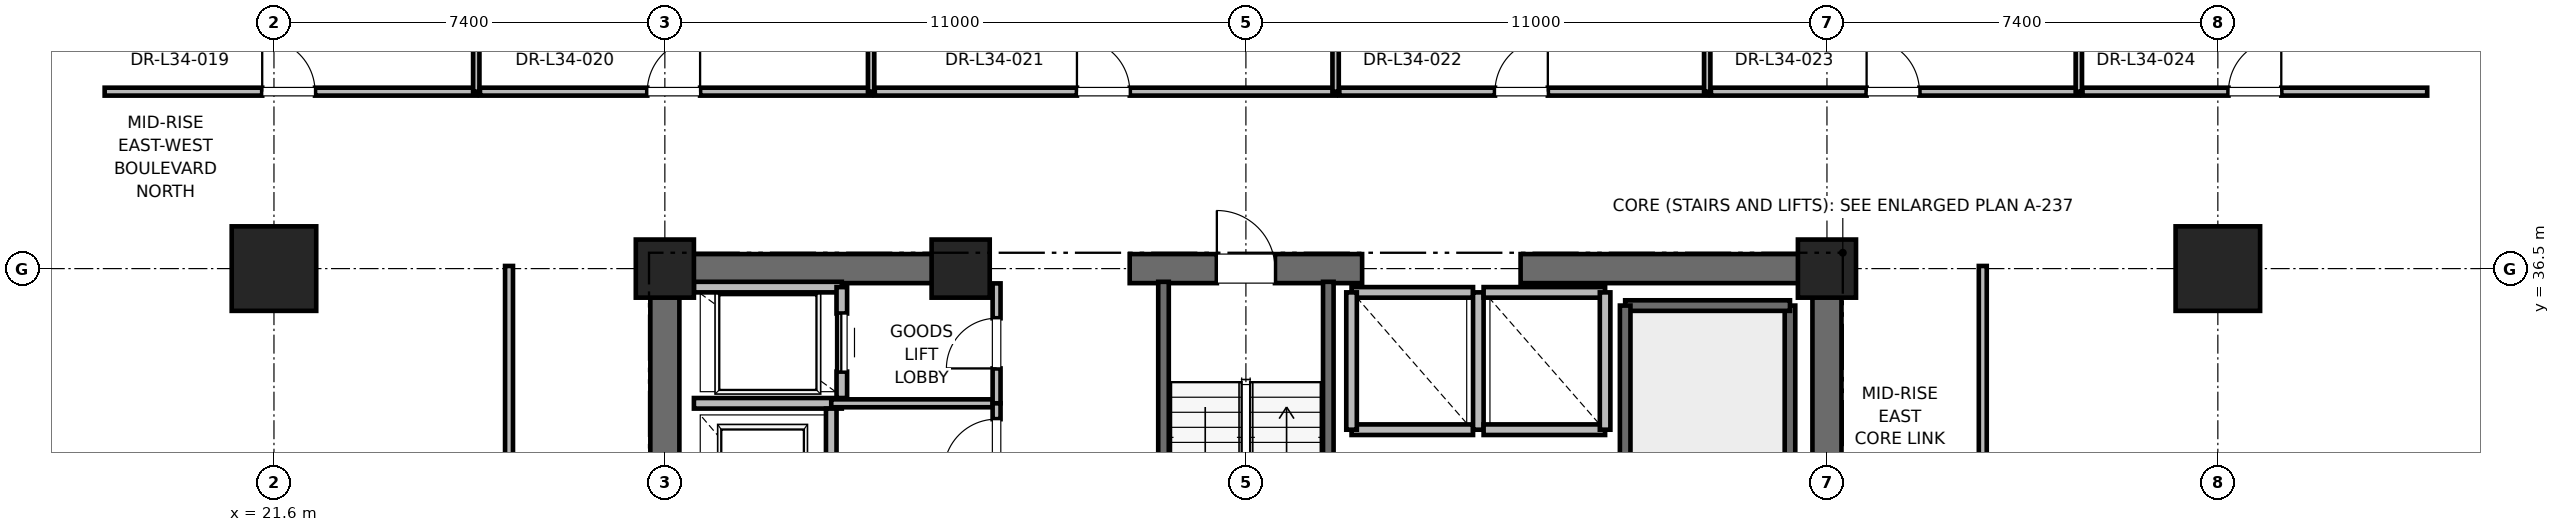
"""IFC4 building model, lengths in metres.
Left out: names, types, materials, properties, quantities, classifications, styles, units other than length and angle.
Written with IfcOpenShell. Run it as: python <this file> out.ifc"""

import sys

from ifc_helpers import new_model, si_unit, direction, frame, frame_2d, origin, origin_2d, place, context, subcontext, project, spatial, rectangle, extrude, element, fill, save


model = new_model("IFC4")
c1 = context("Model", 3, precision=1e-05, world=origin(), true_north=direction((0.0, 1.0)))
c2 = subcontext(c1, "Body", "Model", "MODEL_VIEW")
j1 = project(units=[si_unit("LENGTHUNIT", "METRE"), si_unit("PLANEANGLEUNIT", "RADIAN")], contexts=[c1])
p1 = place(None, origin())
s1 = spatial("IfcSite", under=j1, at=p1, CompositionType="ELEMENT")
p2 = place(p1, origin())
s2 = spatial("IfcBuilding", under=s1, at=p2, CompositionType="ELEMENT")
p3 = place(p2, frame((0.0, 0.0, 148.4)))
s3 = spatial("IfcBuildingStorey", under=s2, at=p3, CompositionType="ELEMENT", Elevation=148.4)
for number, where, z_axis, x_axis in (
    (1, (21.6, 36.5, 0.0), (0.0, 0.0, 1.0), (1.0, 0.0, 0.0)),
    (2, (58.4, 36.5, 0.0), (0.0, 0.0, 1.0), (1.0, 0.0, 0.0)),
):
    element("IfcColumn", number, at=place(p3, frame(where, z_axis=z_axis, x_axis=x_axis)), inside=s3, PredefinedType="COLUMN", context=c2, shape_type="SweptSolid", body=[
        extrude(rectangle(XDim=1.6, YDim=1.6, at=origin_2d()), origin(), (0.0, 0.0, 1.0), 4.0),
    ])
for number, where, z_axis, x_axis in (
    (3, (29.0, 36.5, 0.0), (0.0, 0.0, 1.0), (1.0, 0.0, 0.0)),
    (4, (51.0, 36.5, 0.0), (0.0, 0.0, 1.0), (1.0, 0.0, 0.0)),
    (5, (34.6, 36.5, 0.0), (0.0, 0.0, 1.0), (1.0, 0.0, 0.0)),
):
    element("IfcColumn", number, at=place(p3, frame(where, z_axis=z_axis, x_axis=x_axis)), inside=s3, PredefinedType="PILASTER", context=c2, shape_type="SweptSolid", body=[
        extrude(rectangle(XDim=1.1, YDim=1.1, at=origin_2d()), origin(), (0.0, 0.0, 1.0), 4.0),
    ])
p4 = place(p3, frame((29.0, 36.5, 0.0), z_axis=(0.0, 0.0, 1.0), x_axis=(1.0, 0.0, 0.0)))
e6 = element("IfcWall", 6, at=p4, inside=s3, PredefinedType="SHEAR", context=c2, shape_type="SweptSolid", body=[
    extrude(rectangle(XDim=5.8, YDim=0.55, at=frame_2d((2.9, 0.0))), origin(), (0.0, 0.0, 1.0), 3.775),
])
p5 = place(p3, frame((37.8, 36.5, 0.0), z_axis=(0.0, 0.0, 1.0), x_axis=(1.0, 0.0, 0.0)))
e7 = element("IfcWall", 7, at=p5, inside=s3, PredefinedType="SHEAR", context=c2, shape_type="SweptSolid", body=[
    extrude(rectangle(XDim=4.4, YDim=0.55, at=frame_2d((2.2, 0.0))), origin(), (0.0, 0.0, 1.0), 3.775),
])
p6 = place(p5, frame((1.65, 0.0, 0.0)))
e8 = element("IfcOpeningElement", 8, at=p6, cuts=e7, PredefinedType="OPENING", context=c2, shape_type="SweptSolid", body=[
    extrude(rectangle(XDim=1.1, YDim=2.15, at=frame_2d((0.55, 1.075))), frame((0.0, 0.275, 0.0), z_axis=(0.0, -1.0, 0.0), x_axis=(1.0, 0.0, 0.0)), (0.0, 0.0, 1.0), 0.55),
])
for number, where, z_axis, x_axis in (
    (9, (45.2, 36.5, 0.0), (0.0, 0.0, 1.0), (1.0, 0.0, 0.0)),
    (10, (29.0, 30.7, 0.0), (0.0, 0.0, 1.0), (0.0, 1.0, 0.0)),
):
    element("IfcWall", number, at=place(p3, frame(where, z_axis=z_axis, x_axis=x_axis)), inside=s3, PredefinedType="SHEAR", context=c2, shape_type="SweptSolid", body=[
        extrude(rectangle(XDim=5.8, YDim=0.55, at=frame_2d((2.9, 0.0))), origin(), (0.0, 0.0, 1.0), 3.775),
    ])
p7 = place(p3, frame((51.0, 27.7, 0.0), z_axis=(0.0, 0.0, 1.0), x_axis=(0.0, 1.0, 0.0)))
e11 = element("IfcWall", 11, at=p7, inside=s3, PredefinedType="SHEAR", context=c2, shape_type="SweptSolid", body=[
    extrude(rectangle(XDim=8.8, YDim=0.55, at=frame_2d((4.4, 0.0))), origin(), (0.0, 0.0, 1.0), 3.775),
])
p8 = place(p3, frame((50.3, 27.65, 0.0), z_axis=(0.0, 0.0, 1.0), x_axis=(0.0, 1.0, 0.0)))
e12 = element("IfcWall", 12, at=p8, inside=s3, PredefinedType="SOLIDWALL", context=c2, shape_type="SweptSolid", body=[
    extrude(rectangle(XDim=8.15, YDim=0.2, at=frame_2d((4.075, 0.0))), origin(), (0.0, 0.0, 1.0), 3.775),
])
p9 = place(p3, frame((47.18, 35.8, 0.0), z_axis=(0.0, 0.0, 1.0), x_axis=(1.0, 0.0, 0.0)))
e13 = element("IfcWall", 13, at=p9, inside=s3, PredefinedType="SOLIDWALL", context=c2, shape_type="SweptSolid", body=[
    extrude(rectangle(XDim=3.12, YDim=0.2, at=frame_2d((1.56, 0.0))), origin(), (0.0, 0.0, 1.0), 3.775),
])
p10 = place(p3, frame((47.18, 27.62, 0.0), z_axis=(0.0, 0.0, 1.0), x_axis=(0.0, 1.0, 0.0)))
e14 = element("IfcWall", 14, at=p10, inside=s3, PredefinedType="SOLIDWALL", context=c2, shape_type="SweptSolid", body=[
    extrude(rectangle(XDim=8.18, YDim=0.2, at=frame_2d((4.09, 0.0))), origin(), (0.0, 0.0, 1.0), 3.775),
])
p11 = place(p3, frame((38.44, 27.38, 0.0), z_axis=(0.0, 0.0, 1.0), x_axis=(0.0, 1.0, 0.0)))
e15 = element("IfcWall", 15, at=p11, inside=s3, PredefinedType="SOLIDWALL", context=c2, shape_type="SweptSolid", body=[
    extrude(rectangle(XDim=8.87, YDim=0.2, at=frame_2d((4.435, 0.0))), origin(), (0.0, 0.0, 1.0), 3.775),
])
p12 = place(p3, frame((41.56, 27.68, 0.0), z_axis=(0.0, 0.0, 1.0), x_axis=(0.0, 1.0, 0.0)))
e16 = element("IfcWall", 16, at=p12, inside=s3, PredefinedType="SOLIDWALL", context=c2, shape_type="SweptSolid", body=[
    extrude(rectangle(XDim=8.57, YDim=0.2, at=frame_2d((4.285, 0.0))), origin(), (0.0, 0.0, 1.0), 3.775),
])
p13 = place(p3, frame((29.55, 33.95, 0.0), z_axis=(0.0, 0.0, 1.0), x_axis=(1.0, 0.0, 0.0)))
e17 = element("IfcWall", 17, at=p13, inside=s3, PredefinedType="SOLIDWALL", context=c2, shape_type="SweptSolid", body=[
    extrude(rectangle(XDim=2.8, YDim=0.2, at=frame_2d((1.4, 0.0))), origin(), (0.0, 0.0, 1.0), 3.775),
])
p14 = place(p3, frame((32.15, 30.85, 0.0), z_axis=(0.0, 0.0, 1.0), x_axis=(0.0, 1.0, 0.0)))
e18 = element("IfcWall", 18, at=p14, inside=s3, PredefinedType="SOLIDWALL", context=c2, shape_type="SweptSolid", body=[
    extrude(rectangle(XDim=3.0, YDim=0.2, at=frame_2d((1.5, 0.0))), origin(), (0.0, 0.0, 1.0), 3.775),
])
p15 = place(p3, frame((32.35, 36.15, 0.0), z_axis=(0.0, 0.0, 1.0), x_axis=(-1.0, 0.0, 0.0)))
e19 = element("IfcWall", 19, at=p15, inside=s3, PredefinedType="SOLIDWALL", context=c2, shape_type="SweptSolid", body=[
    extrude(rectangle(XDim=2.8, YDim=0.2, at=frame_2d((1.4, 0.0))), origin(), (0.0, 0.0, 1.0), 2.985),
])
p16 = place(p3, frame((32.35, 34.05, 0.0), z_axis=(0.0, 0.0, 1.0), x_axis=(0.0, 1.0, 0.0)))
e20 = element("IfcWall", 20, at=p16, inside=s3, PredefinedType="SOLIDWALL", context=c2, shape_type="SweptSolid", body=[
    extrude(rectangle(XDim=2.1, YDim=0.2, at=frame_2d((1.05, 0.0))), origin(), (0.0, 0.0, 1.0), 3.775),
])
p17 = place(p16, frame((0.5, 0.0, 0.0)))
e21 = element("IfcOpeningElement", 21, at=p17, cuts=e20, PredefinedType="OPENING", context=c2, shape_type="SweptSolid", body=[
    extrude(rectangle(XDim=1.1, YDim=2.2, at=frame_2d((0.55, 1.1))), frame((0.0, 0.1, 0.0), z_axis=(0.0, -1.0, 0.0), x_axis=(1.0, 0.0, 0.0)), (0.0, 0.0, 1.0), 0.2),
])
p18 = place(p3, frame((42.0, 33.45, 0.0), z_axis=(0.0, 0.0, 1.0), x_axis=(1.0, 0.0, 0.0)))
e22 = element("IfcWall", 22, at=p18, inside=s3, PredefinedType="SOLIDWALL", context=c2, shape_type="SweptSolid", body=[
    extrude(rectangle(XDim=2.3, YDim=0.2, at=frame_2d((1.15, 0.0))), origin(), (0.0, 0.0, 1.0), 3.775),
])
p19 = place(p3, frame((44.3, 36.05, 0.0), z_axis=(0.0, 0.0, 1.0), x_axis=(-1.0, 0.0, 0.0)))
e23 = element("IfcWall", 23, at=p19, inside=s3, PredefinedType="SOLIDWALL", context=c2, shape_type="SweptSolid", body=[
    extrude(rectangle(XDim=2.3, YDim=0.2, at=frame_2d((1.15, 0.0))), origin(), (0.0, 0.0, 1.0), 2.755),
])
for number, where, z_axis, x_axis in (
    (24, (42.0, 36.05, 0.0), (0.0, 0.0, 1.0), (0.0, -1.0, 0.0)),
    (25, (44.4, 33.45, 0.0), (0.0, 0.0, 1.0), (0.0, 1.0, 0.0)),
):
    element("IfcWall", number, at=place(p3, frame(where, z_axis=z_axis, x_axis=x_axis)), inside=s3, PredefinedType="SOLIDWALL", context=c2, shape_type="SweptSolid", body=[
        extrude(rectangle(XDim=2.6, YDim=0.2, at=frame_2d((1.3, 0.0))), origin(), (0.0, 0.0, 1.0), 2.755),
    ])
p20 = place(p3, frame((44.5, 33.45, 0.0), z_axis=(0.0, 0.0, 1.0), x_axis=(1.0, 0.0, 0.0)))
e26 = element("IfcWall", 26, at=p20, inside=s3, PredefinedType="SOLIDWALL", context=c2, shape_type="SweptSolid", body=[
    extrude(rectangle(XDim=2.3, YDim=0.2, at=frame_2d((1.15, 0.0))), origin(), (0.0, 0.0, 1.0), 3.775),
])
p21 = place(p3, frame((46.8, 36.05, 0.0), z_axis=(0.0, 0.0, 1.0), x_axis=(-1.0, 0.0, 0.0)))
e27 = element("IfcWall", 27, at=p21, inside=s3, PredefinedType="SOLIDWALL", context=c2, shape_type="SweptSolid", body=[
    extrude(rectangle(XDim=2.3, YDim=0.2, at=frame_2d((1.15, 0.0))), origin(), (0.0, 0.0, 1.0), 2.755),
])
p22 = place(p3, frame((46.8, 33.45, 0.0), z_axis=(0.0, 0.0, 1.0), x_axis=(0.0, 1.0, 0.0)))
e28 = element("IfcWall", 28, at=p22, inside=s3, PredefinedType="SOLIDWALL", context=c2, shape_type="SweptSolid", body=[
    extrude(rectangle(XDim=2.6, YDim=0.2, at=frame_2d((1.3, 0.0))), origin(), (0.0, 0.0, 1.0), 3.775),
])
p23 = place(p3, frame((32.15, 33.95, 0.0), z_axis=(0.0, 0.0, 1.0), x_axis=(1.0, 0.0, 0.0)))
e29 = element("IfcWall", 29, at=p23, inside=s3, PredefinedType="PARTITIONING", context=c2, shape_type="SweptSolid", body=[
    extrude(rectangle(XDim=3.13, YDim=0.15, at=frame_2d((1.565, 0.0))), origin(), (0.0, 0.0, 1.0), 2.85),
])
p24 = place(p3, frame((35.28, 33.95, 0.0), z_axis=(0.0, 0.0, 1.0), x_axis=(0.0, 1.0, 0.0)))
e30 = element("IfcWall", 30, at=p24, inside=s3, PredefinedType="PARTITIONING", context=c2, shape_type="SweptSolid", body=[
    extrude(rectangle(XDim=2.27, YDim=0.15, at=frame_2d((1.135, 0.0))), origin(), (0.0, 0.0, 1.0), 2.755),
])
p25 = place(p24, frame((0.66, 0.0, 0.0)))
e31 = element("IfcOpeningElement", 31, at=p25, cuts=e30, PredefinedType="OPENING", context=c2, shape_type="SweptSolid", body=[
    extrude(rectangle(XDim=0.95, YDim=2.15, at=frame_2d((0.475, 1.075))), frame((0.0, 0.075, 0.0), z_axis=(0.0, -1.0, 0.0), x_axis=(1.0, 0.0, 0.0)), (0.0, 0.0, 1.0), 0.15),
])
p26 = place(p3, frame((35.28, 32.35, 0.0), z_axis=(0.0, 0.0, 1.0), x_axis=(0.0, 1.0, 0.0)))
e32 = element("IfcWall", 32, at=p26, inside=s3, PredefinedType="PARTITIONING", context=c2, shape_type="SweptSolid", body=[
    extrude(rectangle(XDim=1.6, YDim=0.15, at=frame_2d((0.8, 0.0))), origin(), (0.0, 0.0, 1.0), 2.85),
])
p27 = place(p26, frame((0.3, 0.0, 0.0)))
e33 = element("IfcOpeningElement", 33, at=p27, cuts=e32, PredefinedType="OPENING", context=c2, shape_type="SweptSolid", body=[
    extrude(rectangle(XDim=1.0, YDim=2.15, at=frame_2d((0.5, 1.075))), frame((0.0, 0.075, 0.0), z_axis=(0.0, -1.0, 0.0), x_axis=(1.0, 0.0, 0.0)), (0.0, 0.0, 1.0), 0.15),
])
p28 = place(p3, frame((18.395, 39.85, 0.0), z_axis=(0.0, 0.0, 1.0), x_axis=(1.0, 0.0, 0.0)))
e34 = element("IfcWall", 34, at=p28, inside=s3, PredefinedType="PARTITIONING", context=c2, shape_type="SweptSolid", body=[
    extrude(rectangle(XDim=7.035, YDim=0.15, at=frame_2d((3.518, 0.0))), origin(), (0.0, 0.0, 1.0), 2.85),
])
p29 = place(p28, frame((2.982, 0.0, 0.0)))
e35 = element("IfcOpeningElement", 35, at=p29, cuts=e34, PredefinedType="OPENING", context=c2, shape_type="SweptSolid", body=[
    extrude(rectangle(XDim=1.0, YDim=2.15, at=frame_2d((0.5, 1.075))), frame((0.0, 0.075, 0.0), z_axis=(0.0, -1.0, 0.0), x_axis=(1.0, 0.0, 0.0)), (0.0, 0.0, 1.0), 0.15),
])
p30 = place(p3, frame((25.43, 39.85, 0.0), z_axis=(0.0, 0.0, 1.0), x_axis=(0.0, 1.0, 0.0)))
e36 = element("IfcWall", 36, at=p30, inside=s3, PredefinedType="PARTITIONING", context=c2, shape_type="SweptSolid", body=[
    extrude(rectangle(XDim=9.854, YDim=0.12, at=frame_2d((4.927, 0.0))), origin(), (0.0, 0.0, 1.0), 2.85),
])
p31 = place(p3, frame((25.5, 39.85, 0.0), z_axis=(0.0, 0.0, 1.0), x_axis=(1.0, 0.0, 0.0)))
e37 = element("IfcWall", 37, at=p31, inside=s3, PredefinedType="PARTITIONING", context=c2, shape_type="SweptSolid", body=[
    extrude(rectangle(XDim=7.405, YDim=0.15, at=frame_2d((3.702, 0.0))), origin(), (0.0, 0.0, 1.0), 2.85),
])
p32 = place(p31, frame((3.167, 0.0, 0.0)))
e38 = element("IfcOpeningElement", 38, at=p32, cuts=e37, PredefinedType="OPENING", context=c2, shape_type="SweptSolid", body=[
    extrude(rectangle(XDim=1.0, YDim=2.15, at=frame_2d((0.5, 1.075))), frame((0.0, 0.075, 0.0), z_axis=(0.0, -1.0, 0.0), x_axis=(1.0, 0.0, 0.0)), (0.0, 0.0, 1.0), 0.15),
])
p33 = place(p3, frame((32.905, 39.85, 0.0), z_axis=(0.0, 0.0, 1.0), x_axis=(0.0, 1.0, 0.0)))
e39 = element("IfcWall", 39, at=p33, inside=s3, PredefinedType="PARTITIONING", context=c2, shape_type="SweptSolid", body=[
    extrude(rectangle(XDim=9.854, YDim=0.12, at=frame_2d((4.927, 0.0))), origin(), (0.0, 0.0, 1.0), 2.405),
])
p34 = place(p3, frame((32.975, 39.85, 0.0), z_axis=(0.0, 0.0, 1.0), x_axis=(1.0, 0.0, 0.0)))
e40 = element("IfcWall", 40, at=p34, inside=s3, PredefinedType="PARTITIONING", context=c2, shape_type="SweptSolid", body=[
    extrude(rectangle(XDim=8.724, YDim=0.15, at=frame_2d((4.362, 0.0))), origin(), (0.0, 0.0, 1.0), 2.85),
])
p35 = place(p34, frame((3.827, 0.0, 0.0)))
e41 = element("IfcOpeningElement", 41, at=p35, cuts=e40, PredefinedType="OPENING", context=c2, shape_type="SweptSolid", body=[
    extrude(rectangle(XDim=1.0, YDim=2.15, at=frame_2d((0.5, 1.075))), frame((0.0, 0.075, 0.0), z_axis=(0.0, -1.0, 0.0), x_axis=(1.0, 0.0, 0.0)), (0.0, 0.0, 1.0), 0.15),
])
p36 = place(p3, frame((41.698, 39.85, 0.0), z_axis=(0.0, 0.0, 1.0), x_axis=(0.0, 1.0, 0.0)))
e42 = element("IfcWall", 42, at=p36, inside=s3, PredefinedType="PARTITIONING", context=c2, shape_type="SweptSolid", body=[
    extrude(rectangle(XDim=9.854, YDim=0.12, at=frame_2d((4.927, 0.0))), origin(), (0.0, 0.0, 1.0), 2.405),
])
p37 = place(p3, frame((41.768, 39.85, 0.0), z_axis=(0.0, 0.0, 1.0), x_axis=(1.0, 0.0, 0.0)))
e43 = element("IfcWall", 43, at=p37, inside=s3, PredefinedType="PARTITIONING", context=c2, shape_type="SweptSolid", body=[
    extrude(rectangle(XDim=6.965, YDim=0.15, at=frame_2d((3.482, 0.0))), origin(), (0.0, 0.0, 1.0), 2.85),
])
p38 = place(p37, frame((2.948, 0.0, 0.0)))
e44 = element("IfcOpeningElement", 44, at=p38, cuts=e43, PredefinedType="OPENING", context=c2, shape_type="SweptSolid", body=[
    extrude(rectangle(XDim=1.0, YDim=2.15, at=frame_2d((0.5, 1.075))), frame((0.0, 0.075, 0.0), z_axis=(0.0, -1.0, 0.0), x_axis=(1.0, 0.0, 0.0)), (0.0, 0.0, 1.0), 0.15),
])
p39 = place(p3, frame((48.733, 39.85, 0.0), z_axis=(0.0, 0.0, 1.0), x_axis=(0.0, 1.0, 0.0)))
e45 = element("IfcWall", 45, at=p39, inside=s3, PredefinedType="PARTITIONING", context=c2, shape_type="SweptSolid", body=[
    extrude(rectangle(XDim=9.854, YDim=0.12, at=frame_2d((4.927, 0.0))), origin(), (0.0, 0.0, 1.0), 2.405),
])
p40 = place(p3, frame((48.803, 39.85, 0.0), z_axis=(0.0, 0.0, 1.0), x_axis=(1.0, 0.0, 0.0)))
e46 = element("IfcWall", 46, at=p40, inside=s3, PredefinedType="PARTITIONING", context=c2, shape_type="SweptSolid", body=[
    extrude(rectangle(XDim=6.965, YDim=0.15, at=frame_2d((3.482, 0.0))), origin(), (0.0, 0.0, 1.0), 2.85),
])
p41 = place(p40, frame((2.948, 0.0, 0.0)))
e47 = element("IfcOpeningElement", 47, at=p41, cuts=e46, PredefinedType="OPENING", context=c2, shape_type="SweptSolid", body=[
    extrude(rectangle(XDim=1.0, YDim=2.15, at=frame_2d((0.5, 1.075))), frame((0.0, 0.075, 0.0), z_axis=(0.0, -1.0, 0.0), x_axis=(1.0, 0.0, 0.0)), (0.0, 0.0, 1.0), 0.15),
])
p42 = place(p3, frame((55.768, 39.85, 0.0), z_axis=(0.0, 0.0, 1.0), x_axis=(0.0, 1.0, 0.0)))
e48 = element("IfcWall", 48, at=p42, inside=s3, PredefinedType="PARTITIONING", context=c2, shape_type="SweptSolid", body=[
    extrude(rectangle(XDim=9.854, YDim=0.12, at=frame_2d((4.927, 0.0))), origin(), (0.0, 0.0, 1.0), 2.85),
])
p43 = place(p3, frame((55.838, 39.85, 0.0), z_axis=(0.0, 0.0, 1.0), x_axis=(1.0, 0.0, 0.0)))
e49 = element("IfcWall", 49, at=p43, inside=s3, PredefinedType="PARTITIONING", context=c2, shape_type="SweptSolid", body=[
    extrude(rectangle(XDim=6.525, YDim=0.15, at=frame_2d((3.263, 0.0))), origin(), (0.0, 0.0, 1.0), 2.85),
])
p44 = place(p43, frame((2.763, 0.0, 0.0)))
e50 = element("IfcOpeningElement", 50, at=p44, cuts=e49, PredefinedType="OPENING", context=c2, shape_type="SweptSolid", body=[
    extrude(rectangle(XDim=1.0, YDim=2.15, at=frame_2d((0.5, 1.075))), frame((0.0, 0.075, 0.0), z_axis=(0.0, -1.0, 0.0), x_axis=(1.0, 0.0, 0.0)), (0.0, 0.0, 1.0), 0.15),
])
p45 = place(p3, frame((26.05, 18.45, 0.0), z_axis=(0.0, 0.0, 1.0), x_axis=(0.0, 1.0, 0.0)))
e51 = element("IfcWall", 51, at=p45, inside=s3, PredefinedType="PARTITIONING", context=c2, shape_type="SweptSolid", body=[
    extrude(rectangle(XDim=18.1, YDim=0.15, at=frame_2d((9.05, 0.0))), origin(), (0.0, 0.0, 1.0), 2.85),
])
p46 = place(p45, frame((8.55, 0.0, 0.0)))
e52 = element("IfcOpeningElement", 52, at=p46, cuts=e51, PredefinedType="OPENING", context=c2, shape_type="SweptSolid", body=[
    extrude(rectangle(XDim=1.0, YDim=2.15, at=frame_2d((0.5, 1.075))), frame((0.0, 0.075, 0.0), z_axis=(0.0, -1.0, 0.0), x_axis=(1.0, 0.0, 0.0)), (0.0, 0.0, 1.0), 0.15),
])
p47 = place(p3, frame((53.95, 18.45, 0.0), z_axis=(0.0, 0.0, 1.0), x_axis=(0.0, 1.0, 0.0)))
e53 = element("IfcWall", 53, at=p47, inside=s3, PredefinedType="PARTITIONING", context=c2, shape_type="SweptSolid", body=[
    extrude(rectangle(XDim=18.1, YDim=0.15, at=frame_2d((9.05, 0.0))), origin(), (0.0, 0.0, 1.0), 2.85),
])
p48 = place(p47, frame((8.55, 0.0, 0.0)))
e54 = element("IfcOpeningElement", 54, at=p48, cuts=e53, PredefinedType="OPENING", context=c2, shape_type="SweptSolid", body=[
    extrude(rectangle(XDim=1.0, YDim=2.15, at=frame_2d((0.5, 1.075))), frame((0.0, 0.075, 0.0), z_axis=(0.0, -1.0, 0.0), x_axis=(1.0, 0.0, 0.0)), (0.0, 0.0, 1.0), 0.15),
])
p49 = place(p6, origin())
e55 = element("IfcDoor", 55, at=p49, inside=s3, OperationType="SINGLE_SWING_LEFT", PredefinedType="DOOR", context=c2, shape_type="SweptSolid", body=[
    extrude(rectangle(XDim=1.1, YDim=2.15, at=frame_2d((0.55, 1.075))), frame((0.0, 0.025, 0.0), z_axis=(0.0, -1.0, 0.0), x_axis=(1.0, 0.0, 0.0)), (0.0, 0.0, 1.0), 0.05),
])
fill(e8, e55)
p50 = place(p17, origin())
e56 = element("IfcDoor", 56, at=p50, inside=s3, OperationType="SLIDING_TO_RIGHT", PredefinedType="DOOR", context=c2, shape_type="SweptSolid", body=[
    extrude(rectangle(XDim=1.1, YDim=2.2, at=frame_2d((0.55, 1.1))), frame((0.0, 0.025, 0.0), z_axis=(0.0, -1.0, 0.0), x_axis=(1.0, 0.0, 0.0)), (0.0, 0.0, 1.0), 0.05),
])
fill(e21, e56)
p51 = place(p25, origin())
e57 = element("IfcDoor", 57, at=p51, inside=s3, OperationType="SINGLE_SWING_LEFT", PredefinedType="DOOR", context=c2, shape_type="SweptSolid", body=[
    extrude(rectangle(XDim=0.95, YDim=2.15, at=frame_2d((0.475, 1.075))), frame((0.0, 0.025, 0.0), z_axis=(0.0, -1.0, 0.0), x_axis=(1.0, 0.0, 0.0)), (0.0, 0.0, 1.0), 0.05),
])
fill(e31, e57)
p52 = place(p27, origin())
e58 = element("IfcDoor", 58, at=p52, inside=s3, OperationType="SINGLE_SWING_LEFT", PredefinedType="DOOR", context=c2, shape_type="SweptSolid", body=[
    extrude(rectangle(XDim=1.0, YDim=2.15, at=frame_2d((0.5, 1.075))), frame((0.0, 0.025, 0.0), z_axis=(0.0, -1.0, 0.0), x_axis=(1.0, 0.0, 0.0)), (0.0, 0.0, 1.0), 0.05),
])
fill(e33, e58)
p53 = place(p29, origin())
e59 = element("IfcDoor", 59, at=p53, inside=s3, OperationType="SINGLE_SWING_LEFT", PredefinedType="DOOR", context=c2, shape_type="SweptSolid", body=[
    extrude(rectangle(XDim=1.0, YDim=2.15, at=frame_2d((0.5, 1.075))), frame((0.0, 0.025, 0.0), z_axis=(0.0, -1.0, 0.0), x_axis=(1.0, 0.0, 0.0)), (0.0, 0.0, 1.0), 0.05),
])
fill(e35, e59)
p54 = place(p32, origin())
e60 = element("IfcDoor", 60, at=p54, inside=s3, OperationType="SINGLE_SWING_RIGHT", PredefinedType="DOOR", context=c2, shape_type="SweptSolid", body=[
    extrude(rectangle(XDim=1.0, YDim=2.15, at=frame_2d((0.5, 1.075))), frame((0.0, 0.025, 0.0), z_axis=(0.0, -1.0, 0.0), x_axis=(1.0, 0.0, 0.0)), (0.0, 0.0, 1.0), 0.05),
])
fill(e38, e60)
p55 = place(p35, origin())
e61 = element("IfcDoor", 61, at=p55, inside=s3, OperationType="SINGLE_SWING_LEFT", PredefinedType="DOOR", context=c2, shape_type="SweptSolid", body=[
    extrude(rectangle(XDim=1.0, YDim=2.15, at=frame_2d((0.5, 1.075))), frame((0.0, 0.025, 0.0), z_axis=(0.0, -1.0, 0.0), x_axis=(1.0, 0.0, 0.0)), (0.0, 0.0, 1.0), 0.05),
])
fill(e41, e61)
p56 = place(p38, origin())
e62 = element("IfcDoor", 62, at=p56, inside=s3, OperationType="SINGLE_SWING_RIGHT", PredefinedType="DOOR", context=c2, shape_type="SweptSolid", body=[
    extrude(rectangle(XDim=1.0, YDim=2.15, at=frame_2d((0.5, 1.075))), frame((0.0, 0.025, 0.0), z_axis=(0.0, -1.0, 0.0), x_axis=(1.0, 0.0, 0.0)), (0.0, 0.0, 1.0), 0.05),
])
fill(e44, e62)
p57 = place(p41, origin())
e63 = element("IfcDoor", 63, at=p57, inside=s3, OperationType="SINGLE_SWING_LEFT", PredefinedType="DOOR", context=c2, shape_type="SweptSolid", body=[
    extrude(rectangle(XDim=1.0, YDim=2.15, at=frame_2d((0.5, 1.075))), frame((0.0, 0.025, 0.0), z_axis=(0.0, -1.0, 0.0), x_axis=(1.0, 0.0, 0.0)), (0.0, 0.0, 1.0), 0.05),
])
fill(e47, e63)
p58 = place(p44, origin())
e64 = element("IfcDoor", 64, at=p58, inside=s3, OperationType="SINGLE_SWING_RIGHT", PredefinedType="DOOR", context=c2, shape_type="SweptSolid", body=[
    extrude(rectangle(XDim=1.0, YDim=2.15, at=frame_2d((0.5, 1.075))), frame((0.0, 0.025, 0.0), z_axis=(0.0, -1.0, 0.0), x_axis=(1.0, 0.0, 0.0)), (0.0, 0.0, 1.0), 0.05),
])
fill(e50, e64)
save(model, sys.argv[1])
